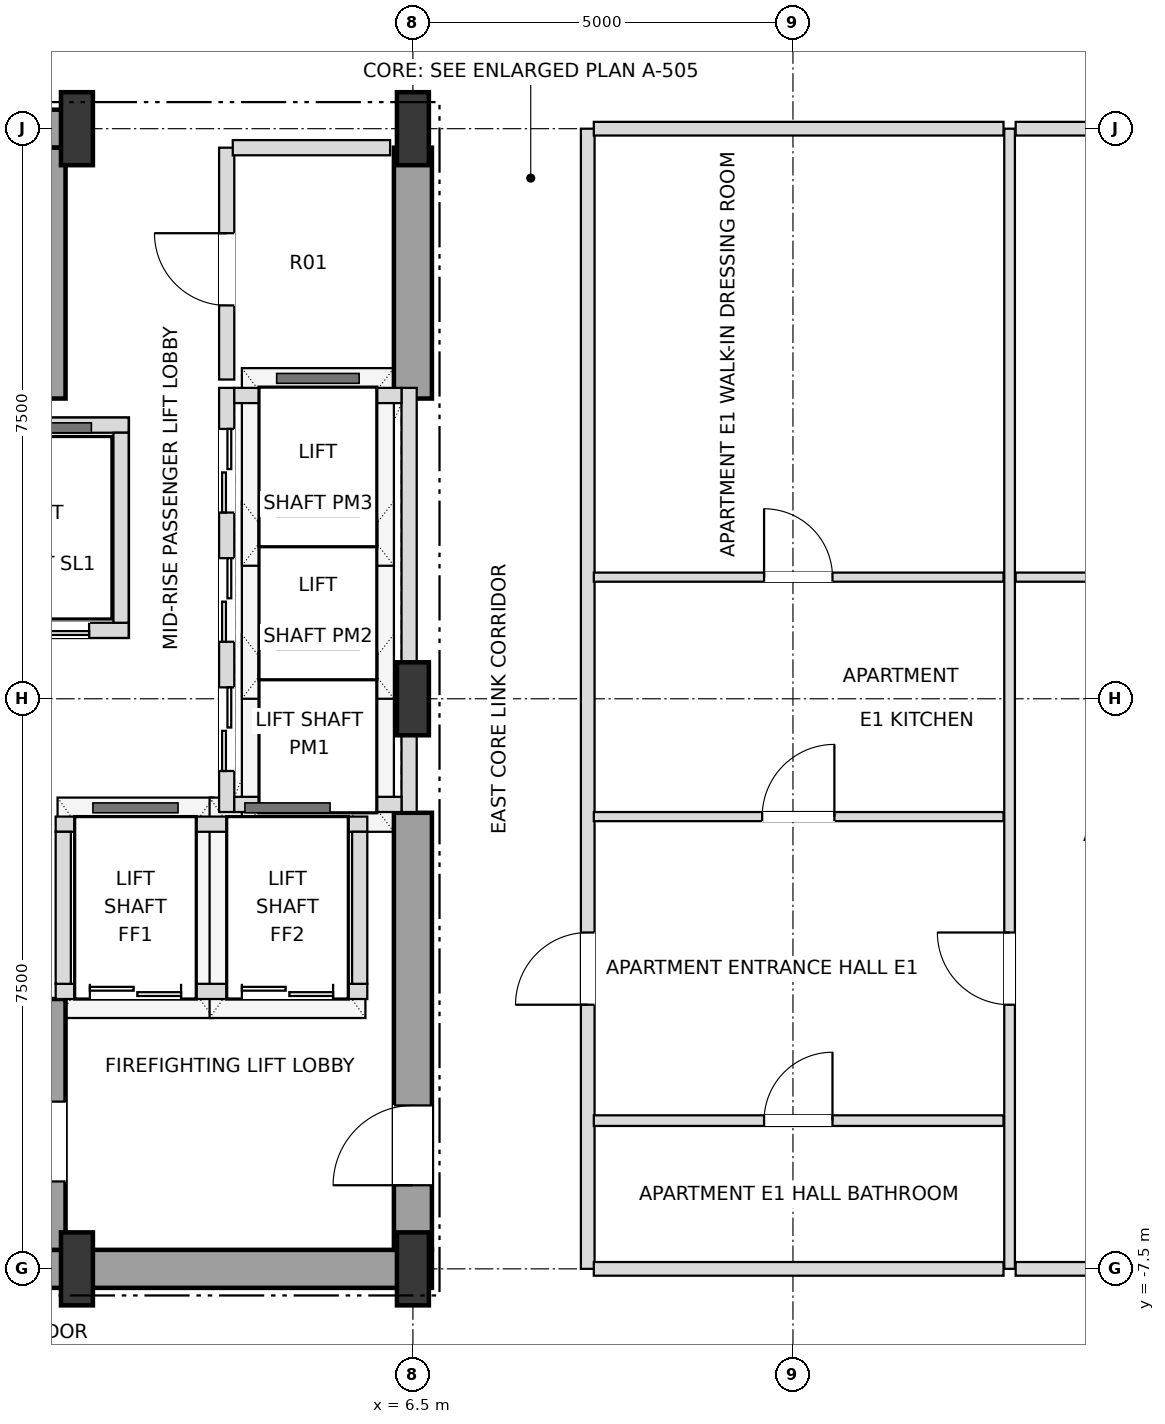
"""IFC4 building model, lengths in metres.
Left out: names, types, materials, properties, quantities, classifications, styles, units other than length and angle.
Written with IfcOpenShell. Run it as: python <this file> out.ifc"""

import sys

from ifc_helpers import new_model, si_unit, direction, frame, frame_2d, origin, origin_2d, place, context, subcontext, project, spatial, rectangle, i_section, extrude, element, fill, save


model = new_model("IFC4")
c1 = context("Model", 3, precision=1e-05, world=origin(), true_north=direction((0.0, 1.0)))
c2 = subcontext(c1, "Body", "Model", "MODEL_VIEW")
j1 = project(units=[si_unit("LENGTHUNIT", "METRE"), si_unit("PLANEANGLEUNIT", "RADIAN")], contexts=[c1])
p1 = place(None, origin())
s1 = spatial("IfcSite", under=j1, at=p1, CompositionType="ELEMENT")
p2 = place(p1, origin())
s2 = spatial("IfcBuilding", under=s1, at=p2, CompositionType="ELEMENT")
p3 = place(p2, frame((0.0, 0.0, 154.8)))
s3 = spatial("IfcBuildingStorey", under=s2, at=p3, CompositionType="ELEMENT", Elevation=154.8)
for number, where, z_axis, x_axis in (
    (1, (2.08, -7.5, 0.0), (0.0, 0.0, 1.0), (1.0, 0.0, 0.0)),
    (2, (6.5, -7.5, 0.0), (0.0, 0.0, 1.0), (1.0, 0.0, 0.0)),
    (3, (6.5, 0.0, 0.0), (0.0, 0.0, 1.0), (1.0, 0.0, 0.0)),
    (4, (2.08, 7.5, 0.0), (0.0, 0.0, 1.0), (1.0, 0.0, 0.0)),
    (5, (6.5, 7.5, 0.0), (0.0, 0.0, 1.0), (1.0, 0.0, 0.0)),
):
    element("IfcColumn", number, at=place(p3, frame(where, z_axis=z_axis, x_axis=x_axis)), inside=s3, PredefinedType="COLUMN", context=c2, shape_type="SweptSolid", body=[
        extrude(i_section(OverallWidth=0.42, OverallDepth=0.96, WebThickness=0.022, FlangeThickness=0.034, at=origin_2d()), origin(), (0.0, 0.0, 1.0), 3.6),
    ])
p4 = place(p3, frame((0.0, -7.5, 0.0), z_axis=(0.0, 0.0, 1.0), x_axis=(1.0, 0.0, 0.0)))
e6 = element("IfcWall", 6, at=p4, inside=s3, PredefinedType="SHEAR", context=c2, shape_type="SweptSolid", body=[
    extrude(rectangle(XDim=6.75, YDim=0.5, at=frame_2d((3.375, 0.0))), origin(), (0.0, 0.0, 1.0), 3.38),
])
p5 = place(p3, frame((0.0, 7.5, 0.0), z_axis=(0.0, 0.0, 1.0), x_axis=(1.0, 0.0, 0.0)))
e7 = element("IfcWall", 7, at=p5, inside=s3, PredefinedType="SHEAR", context=c2, shape_type="SweptSolid", body=[
    extrude(rectangle(XDim=2.08, YDim=0.5, at=frame_2d((1.04, 0.0))), origin(), (0.0, 0.0, 1.0), 3.38),
])
p6 = place(p3, frame((6.5, -7.25, 0.0), z_axis=(0.0, 0.0, 1.0), x_axis=(0.0, 1.0, 0.0)))
e8 = element("IfcWall", 8, at=p6, inside=s3, PredefinedType="SHEAR", context=c2, shape_type="SweptSolid", body=[
    extrude(rectangle(XDim=5.75, YDim=0.5, at=frame_2d((2.875, 0.0))), origin(), (0.0, 0.0, 1.0), 3.38),
])
p7 = place(p6, frame((0.85, 0.0, 0.0)))
e9 = element("IfcOpeningElement", 9, at=p7, cuts=e8, PredefinedType="OPENING", context=c2, shape_type="SweptSolid", body=[
    extrude(rectangle(XDim=1.05, YDim=2.15, at=frame_2d((0.525, 1.075))), frame((0.0, 0.26, 0.0), z_axis=(0.0, -1.0, 0.0), x_axis=(1.0, 0.0, 0.0)), (0.0, 0.0, 1.0), 0.52),
])
p8 = place(p3, frame((6.5, 3.95, 0.0), z_axis=(0.0, 0.0, 1.0), x_axis=(0.0, 1.0, 0.0)))
e10 = element("IfcWall", 10, at=p8, inside=s3, PredefinedType="SHEAR", context=c2, shape_type="SweptSolid", body=[
    extrude(rectangle(XDim=3.3, YDim=0.5, at=frame_2d((1.65, 0.0))), origin(), (0.0, 0.0, 1.0), 3.38),
])
p9 = place(p3, frame((1.73, -7.25, 0.0), z_axis=(0.0, 0.0, 1.0), x_axis=(0.0, 1.0, 0.0)))
e11 = element("IfcWall", 11, at=p9, inside=s3, PredefinedType="SHEAR", context=c2, shape_type="SweptSolid", body=[
    extrude(rectangle(XDim=3.3, YDim=0.4, at=frame_2d((1.65, 0.0))), origin(), (0.0, 0.0, 1.0), 3.38),
])
p10 = place(p9, frame((0.9, 0.0, 0.0)))
e12 = element("IfcOpeningElement", 12, at=p10, cuts=e11, PredefinedType="OPENING", context=c2, shape_type="SweptSolid", body=[
    extrude(rectangle(XDim=1.05, YDim=2.15, at=frame_2d((0.525, 1.075))), frame((0.0, 0.21, 0.0), z_axis=(0.0, -1.0, 0.0), x_axis=(1.0, 0.0, 0.0)), (0.0, 0.0, 1.0), 0.42),
])
p11 = place(p3, frame((1.73, 3.95, 0.0), z_axis=(0.0, 0.0, 1.0), x_axis=(0.0, 1.0, 0.0)))
e13 = element("IfcWall", 13, at=p11, inside=s3, PredefinedType="SHEAR", context=c2, shape_type="SweptSolid", body=[
    extrude(rectangle(XDim=3.3, YDim=0.4, at=frame_2d((1.65, 0.0))), origin(), (0.0, 0.0, 1.0), 3.38),
])
p12 = place(p3, frame((4.05, -1.49, 0.0), z_axis=(0.0, 0.0, 1.0), x_axis=(0.0, 1.0, 0.0)))
e14 = element("IfcWall", 14, at=p12, inside=s3, PredefinedType="SOLIDWALL", context=c2, shape_type="SweptSolid", body=[
    extrude(rectangle(XDim=5.58, YDim=0.2, at=frame_2d((2.79, 0.0))), origin(), (0.0, 0.0, 1.0), 3.38),
])
p13 = place(p12, frame((0.54, 0.0, 0.0)))
e15 = element("IfcOpeningElement", 15, at=p13, cuts=e14, PredefinedType="OPENING", context=c2, shape_type="SweptSolid", body=[
    extrude(rectangle(XDim=1.1, YDim=2.15, at=frame_2d((0.55, 1.075))), frame((0.0, 0.11, 0.0), z_axis=(0.0, -1.0, 0.0), x_axis=(1.0, 0.0, 0.0)), (0.0, 0.0, 1.0), 0.22),
])
p14 = place(p12, frame((2.24, 0.0, 0.0)))
e16 = element("IfcOpeningElement", 16, at=p14, cuts=e14, PredefinedType="OPENING", context=c2, shape_type="SweptSolid", body=[
    extrude(rectangle(XDim=1.1, YDim=2.15, at=frame_2d((0.55, 1.075))), frame((0.0, 0.11, 0.0), z_axis=(0.0, -1.0, 0.0), x_axis=(1.0, 0.0, 0.0)), (0.0, 0.0, 1.0), 0.22),
])
p15 = place(p12, frame((3.94, 0.0, 0.0)))
e17 = element("IfcOpeningElement", 17, at=p15, cuts=e14, PredefinedType="OPENING", context=c2, shape_type="SweptSolid", body=[
    extrude(rectangle(XDim=1.1, YDim=2.15, at=frame_2d((0.55, 1.075))), frame((0.0, 0.11, 0.0), z_axis=(0.0, -1.0, 0.0), x_axis=(1.0, 0.0, 0.0)), (0.0, 0.0, 1.0), 0.22),
])
p16 = place(p3, frame((6.45, -1.49, 0.0), z_axis=(0.0, 0.0, 1.0), x_axis=(0.0, 1.0, 0.0)))
e18 = element("IfcWall", 18, at=p16, inside=s3, PredefinedType="SOLIDWALL", context=c2, shape_type="SweptSolid", body=[
    extrude(rectangle(XDim=5.58, YDim=0.2, at=frame_2d((2.79, 0.0))), origin(), (0.0, 0.0, 1.0), 2.816),
])
for number, where, z_axis, x_axis in (
    (19, (4.15, -1.39, 0.0), (0.0, 0.0, 1.0), (1.0, 0.0, 0.0)),
    (20, (4.15, 3.99, 0.0), (0.0, 0.0, 1.0), (1.0, 0.0, 0.0)),
):
    element("IfcWall", number, at=place(p3, frame(where, z_axis=z_axis, x_axis=x_axis)), inside=s3, PredefinedType="SOLIDWALL", context=c2, shape_type="SweptSolid", body=[
        extrude(rectangle(XDim=2.2, YDim=0.2, at=frame_2d((1.1, 0.0))), origin(), (0.0, 0.0, 1.0), 3.38),
    ])
p17 = place(p3, frame((-2.82, 0.9, 0.0), z_axis=(0.0, 0.0, 1.0), x_axis=(1.0, 0.0, 0.0)))
e21 = element("IfcWall", 21, at=p17, inside=s3, PredefinedType="SOLIDWALL", context=c2, shape_type="SweptSolid", body=[
    extrude(rectangle(XDim=5.58, YDim=0.2, at=frame_2d((2.79, 0.0))), origin(), (0.0, 0.0, 1.0), 3.38),
])
p18 = place(p17, frame((3.86, 0.0, 0.0)))
e22 = element("IfcOpeningElement", 22, at=p18, cuts=e21, PredefinedType="OPENING", context=c2, shape_type="SweptSolid", body=[
    extrude(rectangle(XDim=1.2, YDim=2.2, at=frame_2d((0.6, 1.1))), frame((0.0, 0.11, 0.0), z_axis=(0.0, -1.0, 0.0), x_axis=(1.0, 0.0, 0.0)), (0.0, 0.0, 1.0), 0.22),
])
p19 = place(p3, frame((-2.82, 3.6, 0.0), z_axis=(0.0, 0.0, 1.0), x_axis=(1.0, 0.0, 0.0)))
e23 = element("IfcWall", 23, at=p19, inside=s3, PredefinedType="SOLIDWALL", context=c2, shape_type="SweptSolid", body=[
    extrude(rectangle(XDim=5.58, YDim=0.2, at=frame_2d((2.79, 0.0))), origin(), (0.0, 0.0, 1.0), 3.38),
])
p20 = place(p3, frame((2.66, 1.0, 0.0), z_axis=(0.0, 0.0, 1.0), x_axis=(0.0, 1.0, 0.0)))
e24 = element("IfcWall", 24, at=p20, inside=s3, PredefinedType="SOLIDWALL", context=c2, shape_type="SweptSolid", body=[
    extrude(rectangle(XDim=2.5, YDim=0.2, at=frame_2d((1.25, 0.0))), origin(), (0.0, 0.0, 1.0), 3.38),
])
p21 = place(p3, frame((1.8, -3.85, 0.0), z_axis=(0.0, 0.0, 1.0), x_axis=(1.0, 0.0, 0.0)))
e25 = element("IfcWall", 25, at=p21, inside=s3, PredefinedType="SOLIDWALL", context=c2, shape_type="SweptSolid", body=[
    extrude(rectangle(XDim=4.1, YDim=0.2, at=frame_2d((2.05, 0.0))), origin(), (0.0, 0.0, 1.0), 3.38),
])
p22 = place(p21, frame((0.45, 0.0, 0.0)))
e26 = element("IfcOpeningElement", 26, at=p22, cuts=e25, PredefinedType="OPENING", context=c2, shape_type="SweptSolid", body=[
    extrude(rectangle(XDim=1.2, YDim=2.2, at=frame_2d((0.6, 1.1))), frame((0.0, 0.11, 0.0), z_axis=(0.0, -1.0, 0.0), x_axis=(1.0, 0.0, 0.0)), (0.0, 0.0, 1.0), 0.22),
])
p23 = place(p21, frame((2.45, 0.0, 0.0)))
e27 = element("IfcOpeningElement", 27, at=p23, cuts=e25, PredefinedType="OPENING", context=c2, shape_type="SweptSolid", body=[
    extrude(rectangle(XDim=1.2, YDim=2.2, at=frame_2d((0.6, 1.1))), frame((0.0, 0.11, 0.0), z_axis=(0.0, -1.0, 0.0), x_axis=(1.0, 0.0, 0.0)), (0.0, 0.0, 1.0), 0.22),
])
p24 = place(p3, frame((1.8, -1.65, 0.0), z_axis=(0.0, 0.0, 1.0), x_axis=(1.0, 0.0, 0.0)))
e28 = element("IfcWall", 28, at=p24, inside=s3, PredefinedType="SOLIDWALL", context=c2, shape_type="SweptSolid", body=[
    extrude(rectangle(XDim=4.1, YDim=0.2, at=frame_2d((2.05, 0.0))), origin(), (0.0, 0.0, 1.0), 3.38),
])
for number, where, z_axis, x_axis in (
    (29, (1.9, -3.75, 0.0), (0.0, 0.0, 1.0), (0.0, 1.0, 0.0)),
    (30, (5.8, -3.75, 0.0), (0.0, 0.0, 1.0), (0.0, 1.0, 0.0)),
):
    element("IfcWall", number, at=place(p3, frame(where, z_axis=z_axis, x_axis=x_axis)), inside=s3, PredefinedType="SOLIDWALL", context=c2, shape_type="SweptSolid", body=[
        extrude(rectangle(XDim=2.0, YDim=0.2, at=frame_2d((1.0, 0.0))), origin(), (0.0, 0.0, 1.0), 3.38),
    ])
p25 = place(p3, frame((4.05, 4.2, 0.0), z_axis=(0.0, 0.0, 1.0), x_axis=(0.0, 1.0, 0.0)))
e31 = element("IfcWall", 31, at=p25, inside=s3, PredefinedType="SOLIDWALL", context=c2, shape_type="SweptSolid", body=[
    extrude(rectangle(XDim=3.05, YDim=0.2, at=frame_2d((1.525, 0.0))), origin(), (0.0, 0.0, 1.0), 3.38),
])
p26 = place(p25, frame((0.975, 0.0, 0.0)))
e32 = element("IfcOpeningElement", 32, at=p26, cuts=e31, PredefinedType="OPENING", context=c2, shape_type="SweptSolid", body=[
    extrude(rectangle(XDim=0.95, YDim=2.15, at=frame_2d((0.475, 1.075))), frame((0.0, 0.11, 0.0), z_axis=(0.0, -1.0, 0.0), x_axis=(1.0, 0.0, 0.0)), (0.0, 0.0, 1.0), 0.22),
])
p27 = place(p3, frame((8.8, -7.5, 0.0), z_axis=(0.0, 0.0, 1.0), x_axis=(0.0, 1.0, 0.0)))
e33 = element("IfcWall", 33, at=p27, inside=s3, PredefinedType="PARTITIONING", context=c2, shape_type="SweptSolid", body=[
    extrude(rectangle(XDim=15.0, YDim=0.18, at=frame_2d((7.5, 0.0))), origin(), (0.0, 0.0, 1.0), 3.38),
])
p28 = place(p27, frame((3.475, 0.0, 0.0)))
e34 = element("IfcOpeningElement", 34, at=p28, cuts=e33, PredefinedType="OPENING", context=c2, shape_type="SweptSolid", body=[
    extrude(rectangle(XDim=0.95, YDim=2.15, at=frame_2d((0.475, 1.075))), frame((0.0, 0.1, 0.0), z_axis=(0.0, -1.0, 0.0), x_axis=(1.0, 0.0, 0.0)), (0.0, 0.0, 1.0), 0.2),
])
p29 = place(p3, frame((14.35, -7.5, 0.0), z_axis=(0.0, 0.0, 1.0), x_axis=(0.0, 1.0, 0.0)))
e35 = element("IfcWall", 35, at=p29, inside=s3, PredefinedType="PARTITIONING", context=c2, shape_type="SweptSolid", body=[
    extrude(rectangle(XDim=15.0, YDim=0.14, at=frame_2d((7.5, 0.0))), origin(), (0.0, 0.0, 1.0), 3.38),
])
p30 = place(p29, frame((3.475, 0.0, 0.0)))
e36 = element("IfcOpeningElement", 36, at=p30, cuts=e35, PredefinedType="OPENING", context=c2, shape_type="SweptSolid", body=[
    extrude(rectangle(XDim=0.95, YDim=2.1, at=frame_2d((0.475, 1.05))), frame((0.0, 0.08, 0.0), z_axis=(0.0, -1.0, 0.0), x_axis=(1.0, 0.0, 0.0)), (0.0, 0.0, 1.0), 0.16),
])
p31 = place(p3, frame((8.88, -7.5, 0.0), z_axis=(0.0, 0.0, 1.0), x_axis=(1.0, 0.0, 0.0)))
e37 = element("IfcWall", 37, at=p31, inside=s3, PredefinedType="PARTITIONING", context=c2, shape_type="SweptSolid", body=[
    extrude(rectangle(XDim=5.39, YDim=0.18, at=frame_2d((2.695, 0.0))), origin(), (0.0, 0.0, 1.0), 2.816),
])
p32 = place(p3, frame((14.43, -7.5, 0.0), z_axis=(0.0, 0.0, 1.0), x_axis=(1.0, 0.0, 0.0)))
e38 = element("IfcWall", 38, at=p32, inside=s3, PredefinedType="PARTITIONING", context=c2, shape_type="SweptSolid", body=[
    extrude(rectangle(XDim=5.72, YDim=0.18, at=frame_2d((2.86, 0.0))), origin(), (0.0, 0.0, 1.0), 2.816),
])
p33 = place(p3, frame((8.88, -5.55, 0.0), z_axis=(0.0, 0.0, 1.0), x_axis=(1.0, 0.0, 0.0)))
e39 = element("IfcWall", 39, at=p33, inside=s3, PredefinedType="PARTITIONING", context=c2, shape_type="SweptSolid", body=[
    extrude(rectangle(XDim=5.39, YDim=0.14, at=frame_2d((2.695, 0.0))), origin(), (0.0, 0.0, 1.0), 3.38),
])
p34 = place(p33, frame((2.24, 0.0, 0.0)))
e40 = element("IfcOpeningElement", 40, at=p34, cuts=e39, PredefinedType="OPENING", context=c2, shape_type="SweptSolid", body=[
    extrude(rectangle(XDim=0.9, YDim=2.1, at=frame_2d((0.45, 1.05))), frame((0.0, 0.08, 0.0), z_axis=(0.0, -1.0, 0.0), x_axis=(1.0, 0.0, 0.0)), (0.0, 0.0, 1.0), 0.16),
])
p35 = place(p3, frame((8.88, -1.55, 0.0), z_axis=(0.0, 0.0, 1.0), x_axis=(1.0, 0.0, 0.0)))
e41 = element("IfcWall", 41, at=p35, inside=s3, PredefinedType="PARTITIONING", context=c2, shape_type="SweptSolid", body=[
    extrude(rectangle(XDim=5.39, YDim=0.12, at=frame_2d((2.695, 0.0))), origin(), (0.0, 0.0, 1.0), 3.38),
])
p36 = place(p35, frame((2.215, 0.0, 0.0)))
e42 = element("IfcOpeningElement", 42, at=p36, cuts=e41, PredefinedType="OPENING", context=c2, shape_type="SweptSolid", body=[
    extrude(rectangle(XDim=0.95, YDim=2.1, at=frame_2d((0.475, 1.05))), frame((0.0, 0.07, 0.0), z_axis=(0.0, -1.0, 0.0), x_axis=(1.0, 0.0, 0.0)), (0.0, 0.0, 1.0), 0.14),
])
p37 = place(p3, frame((8.88, 1.6, 0.0), z_axis=(0.0, 0.0, 1.0), x_axis=(1.0, 0.0, 0.0)))
e43 = element("IfcWall", 43, at=p37, inside=s3, PredefinedType="PARTITIONING", context=c2, shape_type="SweptSolid", body=[
    extrude(rectangle(XDim=5.39, YDim=0.12, at=frame_2d((2.695, 0.0))), origin(), (0.0, 0.0, 1.0), 3.38),
])
p38 = place(p37, frame((2.24, 0.0, 0.0)))
e44 = element("IfcOpeningElement", 44, at=p38, cuts=e43, PredefinedType="OPENING", context=c2, shape_type="SweptSolid", body=[
    extrude(rectangle(XDim=0.9, YDim=2.1, at=frame_2d((0.45, 1.05))), frame((0.0, 0.07, 0.0), z_axis=(0.0, -1.0, 0.0), x_axis=(1.0, 0.0, 0.0)), (0.0, 0.0, 1.0), 0.14),
])
p39 = place(p3, frame((14.43, 1.6, 0.0), z_axis=(0.0, 0.0, 1.0), x_axis=(1.0, 0.0, 0.0)))
e45 = element("IfcWall", 45, at=p39, inside=s3, PredefinedType="PARTITIONING", context=c2, shape_type="SweptSolid", body=[
    extrude(rectangle(XDim=5.64, YDim=0.12, at=frame_2d((2.82, 0.0))), origin(), (0.0, 0.0, 1.0), 2.816),
])
p40 = place(p39, frame((2.37, 0.0, 0.0)))
e46 = element("IfcOpeningElement", 46, at=p40, cuts=e45, PredefinedType="OPENING", context=c2, shape_type="SweptSolid", body=[
    extrude(rectangle(XDim=0.9, YDim=2.1, at=frame_2d((0.45, 1.05))), frame((0.0, 0.07, 0.0), z_axis=(0.0, -1.0, 0.0), x_axis=(1.0, 0.0, 0.0)), (0.0, 0.0, 1.0), 0.14),
])
p41 = place(p3, frame((4.13, 7.25, 0.0), z_axis=(0.0, 0.0, 1.0), x_axis=(1.0, 0.0, 0.0)))
e47 = element("IfcWall", 47, at=p41, inside=s3, PredefinedType="SOLIDWALL", context=c2, shape_type="SweptSolid", body=[
    extrude(rectangle(XDim=2.07, YDim=0.2, at=frame_2d((1.035, 0.0))), origin(), (0.0, 0.0, 1.0), 3.38),
])
p42 = place(p3, frame((8.88, 7.5, 0.0), z_axis=(0.0, 0.0, 1.0), x_axis=(1.0, 0.0, 0.0)))
e48 = element("IfcWall", 48, at=p42, inside=s3, PredefinedType="PARTITIONING", context=c2, shape_type="SweptSolid", body=[
    extrude(rectangle(XDim=5.39, YDim=0.18, at=frame_2d((2.695, 0.0))), origin(), (0.0, 0.0, 1.0), 2.816),
])
p43 = place(p3, frame((14.43, 7.5, 0.0), z_axis=(0.0, 0.0, 1.0), x_axis=(1.0, 0.0, 0.0)))
e49 = element("IfcWall", 49, at=p43, inside=s3, PredefinedType="PARTITIONING", context=c2, shape_type="SweptSolid", body=[
    extrude(rectangle(XDim=5.72, YDim=0.18, at=frame_2d((2.86, 0.0))), origin(), (0.0, 0.0, 1.0), 2.816),
])
p44 = place(p7, origin())
e50 = element("IfcDoor", 50, at=p44, inside=s3, OperationType="SINGLE_SWING_LEFT", PredefinedType="DOOR", context=c2, shape_type="SweptSolid", body=[
    extrude(rectangle(XDim=1.05, YDim=2.15, at=frame_2d((0.525, 1.075))), frame((0.0, 0.025, 0.0), z_axis=(0.0, -1.0, 0.0), x_axis=(1.0, 0.0, 0.0)), (0.0, 0.0, 1.0), 0.05),
])
fill(e9, e50)
p45 = place(p13, origin())
e51 = element("IfcDoor", 51, at=p45, inside=s3, OperationType="DOUBLE_DOOR_SLIDING", PredefinedType="DOOR", context=c2, shape_type="SweptSolid", body=[
    extrude(rectangle(XDim=1.1, YDim=2.15, at=frame_2d((0.55, 1.075))), frame((0.0, 0.025, 0.0), z_axis=(0.0, -1.0, 0.0), x_axis=(1.0, 0.0, 0.0)), (0.0, 0.0, 1.0), 0.05),
])
fill(e15, e51)
p46 = place(p14, origin())
e52 = element("IfcDoor", 52, at=p46, inside=s3, OperationType="DOUBLE_DOOR_SLIDING", PredefinedType="DOOR", context=c2, shape_type="SweptSolid", body=[
    extrude(rectangle(XDim=1.1, YDim=2.15, at=frame_2d((0.55, 1.075))), frame((0.0, 0.025, 0.0), z_axis=(0.0, -1.0, 0.0), x_axis=(1.0, 0.0, 0.0)), (0.0, 0.0, 1.0), 0.05),
])
fill(e16, e52)
p47 = place(p15, origin())
e53 = element("IfcDoor", 53, at=p47, inside=s3, OperationType="DOUBLE_DOOR_SLIDING", PredefinedType="DOOR", context=c2, shape_type="SweptSolid", body=[
    extrude(rectangle(XDim=1.1, YDim=2.15, at=frame_2d((0.55, 1.075))), frame((0.0, 0.025, 0.0), z_axis=(0.0, -1.0, 0.0), x_axis=(1.0, 0.0, 0.0)), (0.0, 0.0, 1.0), 0.05),
])
fill(e17, e53)
p48 = place(p18, origin())
e54 = element("IfcDoor", 54, at=p48, inside=s3, OperationType="DOUBLE_DOOR_SLIDING", PredefinedType="DOOR", context=c2, shape_type="SweptSolid", body=[
    extrude(rectangle(XDim=1.2, YDim=2.2, at=frame_2d((0.6, 1.1))), frame((0.0, 0.025, 0.0), z_axis=(0.0, -1.0, 0.0), x_axis=(1.0, 0.0, 0.0)), (0.0, 0.0, 1.0), 0.05),
])
fill(e22, e54)
p49 = place(p22, origin())
e55 = element("IfcDoor", 55, at=p49, inside=s3, OperationType="DOUBLE_DOOR_SLIDING", PredefinedType="DOOR", context=c2, shape_type="SweptSolid", body=[
    extrude(rectangle(XDim=1.2, YDim=2.2, at=frame_2d((0.6, 1.1))), frame((0.0, 0.025, 0.0), z_axis=(0.0, -1.0, 0.0), x_axis=(1.0, 0.0, 0.0)), (0.0, 0.0, 1.0), 0.05),
])
fill(e26, e55)
p50 = place(p23, origin())
e56 = element("IfcDoor", 56, at=p50, inside=s3, OperationType="DOUBLE_DOOR_SLIDING", PredefinedType="DOOR", context=c2, shape_type="SweptSolid", body=[
    extrude(rectangle(XDim=1.2, YDim=2.2, at=frame_2d((0.6, 1.1))), frame((0.0, 0.025, 0.0), z_axis=(0.0, -1.0, 0.0), x_axis=(1.0, 0.0, 0.0)), (0.0, 0.0, 1.0), 0.05),
])
fill(e27, e56)
p51 = place(p26, origin())
e57 = element("IfcDoor", 57, at=p51, inside=s3, OperationType="SINGLE_SWING_RIGHT", PredefinedType="DOOR", context=c2, shape_type="SweptSolid", body=[
    extrude(rectangle(XDim=0.95, YDim=2.15, at=frame_2d((0.475, 1.075))), frame((0.0, 0.025, 0.0), z_axis=(0.0, -1.0, 0.0), x_axis=(1.0, 0.0, 0.0)), (0.0, 0.0, 1.0), 0.05),
])
fill(e32, e57)
p52 = place(p34, origin())
e58 = element("IfcDoor", 58, at=p52, inside=s3, OperationType="SINGLE_SWING_RIGHT", PredefinedType="DOOR", context=c2, shape_type="SweptSolid", body=[
    extrude(rectangle(XDim=0.9, YDim=2.1, at=frame_2d((0.45, 1.05))), frame((0.0, 0.025, 0.0), z_axis=(0.0, -1.0, 0.0), x_axis=(1.0, 0.0, 0.0)), (0.0, 0.0, 1.0), 0.05),
])
fill(e40, e58)
p53 = place(p28, origin())
e59 = element("IfcDoor", 59, at=p53, inside=s3, OperationType="SINGLE_SWING_LEFT", PredefinedType="DOOR", context=c2, shape_type="SweptSolid", body=[
    extrude(rectangle(XDim=0.95, YDim=2.15, at=frame_2d((0.475, 1.075))), frame((0.0, 0.025, 0.0), z_axis=(0.0, -1.0, 0.0), x_axis=(1.0, 0.0, 0.0)), (0.0, 0.0, 1.0), 0.05),
])
fill(e34, e59)
p54 = place(p36, origin())
e60 = element("IfcDoor", 60, at=p54, inside=s3, OperationType="SINGLE_SWING_RIGHT", PredefinedType="DOOR", context=c2, shape_type="SweptSolid", body=[
    extrude(rectangle(XDim=0.95, YDim=2.1, at=frame_2d((0.475, 1.05))), frame((0.0, 0.025, 0.0), z_axis=(0.0, -1.0, 0.0), x_axis=(1.0, 0.0, 0.0)), (0.0, 0.0, 1.0), 0.05),
])
fill(e42, e60)
p55 = place(p38, origin())
e61 = element("IfcDoor", 61, at=p55, inside=s3, OperationType="SINGLE_SWING_LEFT", PredefinedType="DOOR", context=c2, shape_type="SweptSolid", body=[
    extrude(rectangle(XDim=0.9, YDim=2.1, at=frame_2d((0.45, 1.05))), frame((0.0, 0.025, 0.0), z_axis=(0.0, -1.0, 0.0), x_axis=(1.0, 0.0, 0.0)), (0.0, 0.0, 1.0), 0.05),
])
fill(e44, e61)
p56 = place(p30, origin())
e62 = element("IfcDoor", 62, at=p56, inside=s3, OperationType="SINGLE_SWING_RIGHT", PredefinedType="DOOR", context=c2, shape_type="SweptSolid", body=[
    extrude(rectangle(XDim=0.95, YDim=2.1, at=frame_2d((0.475, 1.05))), frame((0.0, 0.025, 0.0), z_axis=(0.0, -1.0, 0.0), x_axis=(1.0, 0.0, 0.0)), (0.0, 0.0, 1.0), 0.05),
])
fill(e36, e62)
save(model, sys.argv[1])
